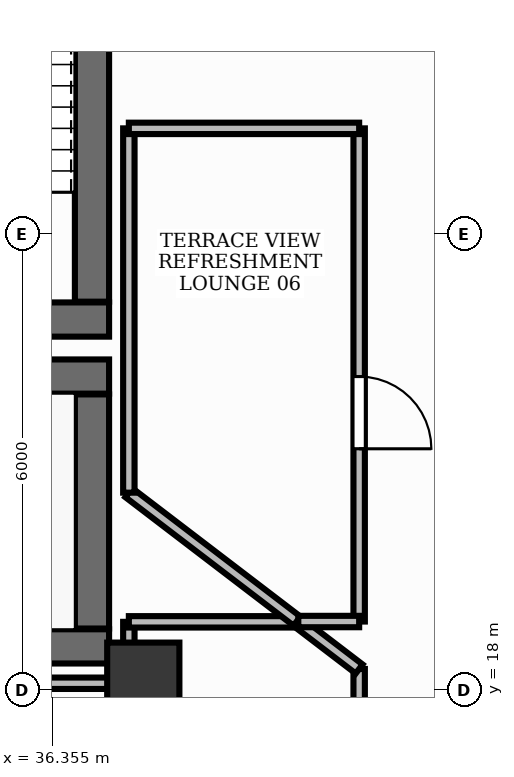
"""IFC4 building model, lengths in metres.
Left out: names, types, materials, properties, quantities, classifications, styles, units other than length and angle.
Written with IfcOpenShell. Run it as: python <this file> out.ifc"""

import sys

from ifc_helpers import new_model, si_unit, direction, frame, frame_2d, origin, origin_2d, place, context, subcontext, project, spatial, rectangle, extrude, element, fill, save


model = new_model("IFC4")
c1 = context("Model", 3, precision=1e-05, world=origin(), true_north=direction((0.0, 1.0)))
c2 = subcontext(c1, "Body", "Model", "MODEL_VIEW")
j1 = project(units=[si_unit("LENGTHUNIT", "METRE"), si_unit("PLANEANGLEUNIT", "RADIAN")], contexts=[c1])
p1 = place(None, origin())
s1 = spatial("IfcSite", under=j1, at=p1, CompositionType="ELEMENT")
p2 = place(p1, origin())
s2 = spatial("IfcBuilding", under=s1, at=p2, CompositionType="ELEMENT")
p3 = place(p2, frame((0.0, 0.0, 25.8)))
s3 = spatial("IfcBuildingStorey", under=s2, at=p3, CompositionType="ELEMENT", Elevation=25.8)
p4 = place(p3, frame((28.852, 18.575, 0.0), z_axis=(0.0, 0.0, 1.0), x_axis=(1.0, 0.0, 0.0)))
e1 = element("IfcWall", 1, at=p4, inside=s3, PredefinedType="SHEAR", context=c2, shape_type="SweptSolid", body=[
    extrude(rectangle(XDim=8.248, YDim=0.45, at=frame_2d((4.124, 0.0))), origin(), (0.0, 0.0, 1.0), 3.9),
])
p5 = place(p3, frame((28.35, 22.125, 0.0), z_axis=(0.0, 0.0, 1.0), x_axis=(1.0, 0.0, 0.0)))
e2 = element("IfcWall", 2, at=p5, inside=s3, PredefinedType="SHEAR", context=c2, shape_type="SweptSolid", body=[
    extrude(rectangle(XDim=8.75, YDim=0.45, at=frame_2d((4.375, 0.0))), origin(), (0.0, 0.0, 1.0), 3.9),
])
p6 = place(p3, frame((36.875, 18.81, 0.0), z_axis=(0.0, 0.0, 1.0), x_axis=(0.0, 1.0, 0.0)))
e3 = element("IfcWall", 3, at=p6, inside=s3, PredefinedType="SHEAR", context=c2, shape_type="SweptSolid", body=[
    extrude(rectangle(XDim=3.08, YDim=0.45, at=frame_2d((1.54, 0.0))), origin(), (0.0, 0.0, 1.0), 3.9),
])
p7 = place(p3, frame((33.1, 22.875, 0.0), z_axis=(0.0, 0.0, 1.0), x_axis=(1.0, 0.0, 0.0)))
e4 = element("IfcWall", 4, at=p7, inside=s3, PredefinedType="SHEAR", context=c2, shape_type="SweptSolid", body=[
    extrude(rectangle(XDim=4.0, YDim=0.45, at=frame_2d((2.0, 0.0))), origin(), (0.0, 0.0, 1.0), 3.9),
])
p8 = place(p3, frame((36.875, 23.11, 0.0), z_axis=(0.0, 0.0, 1.0), x_axis=(0.0, 1.0, 0.0)))
e5 = element("IfcWall", 5, at=p8, inside=s3, PredefinedType="SHEAR", context=c2, shape_type="SweptSolid", body=[
    extrude(rectangle(XDim=7.78, YDim=0.45, at=frame_2d((3.89, 0.0))), origin(), (0.0, 0.0, 1.0), 3.9),
])
p9 = place(p3, frame((37.55, 18.15, -0.0), z_axis=(0.0, 0.0, 1.0), x_axis=(1.0, 0.0, 0.0)))
e6 = element("IfcColumn", 6, at=p9, inside=s3, PredefinedType="PILASTER", context=c2, shape_type="SweptSolid", body=[
    extrude(rectangle(XDim=0.95, YDim=0.95, at=origin_2d()), origin(), (0.0, 0.0, 1.0), 3.901),
])
p10 = place(p3, frame((40.39, 18.278, 0.0), z_axis=(0.0, 0.0, 1.0), x_axis=(0.0, -1.0, 0.0)))
e7 = element("IfcWall", 7, at=p10, inside=s3, PredefinedType="PARTITIONING", context=c2, shape_type="SweptSolid", body=[
    extrude(rectangle(XDim=1.778, YDim=0.15, at=frame_2d((0.889, 0.0))), origin(), (0.0, 0.0, 1.0), 2.91),
])
p11 = place(p10, frame((0.588, 0.0, 0.0)))
e8 = element("IfcOpeningElement", 8, at=p11, cuts=e7, PredefinedType="OPENING", context=c2, shape_type="SweptSolid", body=[
    extrude(rectangle(XDim=0.95, YDim=2.15, at=frame_2d((0.475, 1.075))), frame((0.0, 0.09, 0.0), z_axis=(0.0, -1.0, 0.0), x_axis=(1.0, 0.0, 0.0)), (0.0, 0.0, 1.0), 0.18),
])
p12 = place(p3, frame((40.39, 25.39, 0.0), z_axis=(0.0, 0.0, 1.0), x_axis=(0.0, -1.0, 0.0)))
e9 = element("IfcWall", 9, at=p12, inside=s3, PredefinedType="PARTITIONING", context=c2, shape_type="SweptSolid", body=[
    extrude(rectangle(XDim=6.488, YDim=0.15, at=frame_2d((3.244, 0.0))), origin(), (0.0, 0.0, 1.0), 2.91),
])
p13 = place(p12, frame((3.265, 0.0, 0.0)))
e10 = element("IfcOpeningElement", 10, at=p13, cuts=e9, PredefinedType="OPENING", context=c2, shape_type="SweptSolid", body=[
    extrude(rectangle(XDim=0.95, YDim=2.15, at=frame_2d((0.475, 1.075))), frame((0.0, 0.09, 0.0), z_axis=(0.0, -1.0, 0.0), x_axis=(1.0, 0.0, 0.0)), (0.0, 0.0, 1.0), 0.18),
])
p14 = place(p3, frame((29.0, 18.09, 0.0), z_axis=(0.0, 0.0, 1.0), x_axis=(1.0, 0.0, 0.0)))
e11 = element("IfcWall", 11, at=p14, inside=s3, PredefinedType="PARTITIONING", context=c2, shape_type="SweptSolid", body=[
    extrude(rectangle(XDim=8.35, YDim=0.15, at=frame_2d((4.175, 0.0))), origin(), (0.0, 0.0, 1.0), 2.91),
])
p15 = place(p3, frame((37.36, 18.1, 0.0), z_axis=(0.0, 0.0, 1.0), x_axis=(0.0, 1.0, 0.0)))
e12 = element("IfcWall", 12, at=p15, inside=s3, PredefinedType="PARTITIONING", context=c2, shape_type="SweptSolid", body=[
    extrude(rectangle(XDim=0.798, YDim=0.15, at=frame_2d((0.399, 0.0))), origin(), (0.0, 0.0, 1.0), 2.91),
])
p16 = place(p3, frame((37.36, 18.898, 0.0), z_axis=(0.0, 0.0, 1.0), x_axis=(1.0, 0.0, 0.0)))
e13 = element("IfcWall", 13, at=p16, inside=s3, PredefinedType="PARTITIONING", context=c2, shape_type="SweptSolid", body=[
    extrude(rectangle(XDim=2.218, YDim=0.15, at=frame_2d((1.109, 0.0))), origin(), (0.0, 0.0, 1.0), 2.91),
])
p17 = place(p3, frame((39.578, 18.898, 0.0), z_axis=(0.0, 0.0, 1.0), x_axis=(0.794690228638, -0.607015189684, 0.0)))
e14 = element("IfcWall", 14, at=p17, inside=s3, PredefinedType="PARTITIONING", context=c2, shape_type="SweptSolid", body=[
    extrude(rectangle(XDim=1.021, YDim=0.15, at=frame_2d((0.511, 0.0))), origin(), (0.0, 0.0, 1.0), 2.91),
])
p18 = place(p3, frame((39.572, 18.908, 0.0), z_axis=(0.0, 0.0, 1.0), x_axis=(-0.794673946055, 0.607036505872, 0.0)))
e15 = element("IfcWall", 15, at=p18, inside=s3, PredefinedType="PARTITIONING", context=c2, shape_type="SweptSolid", body=[
    extrude(rectangle(XDim=2.783, YDim=0.15, at=frame_2d((1.392, 0.0))), origin(), (0.0, 0.0, 1.0), 2.91),
])
p19 = place(p3, frame((37.36, 20.597, 0.0), z_axis=(0.0, 0.0, 1.0), x_axis=(0.0, 1.0, 0.0)))
e16 = element("IfcWall", 16, at=p19, inside=s3, PredefinedType="PARTITIONING", context=c2, shape_type="SweptSolid", body=[
    extrude(rectangle(XDim=4.792, YDim=0.15, at=frame_2d((2.396, 0.0))), origin(), (0.0, 0.0, 1.0), 2.91),
])
p20 = place(p3, frame((37.36, 25.39, 0.0), z_axis=(0.0, 0.0, 1.0), x_axis=(1.0, 0.0, 0.0)))
e17 = element("IfcWall", 17, at=p20, inside=s3, PredefinedType="PARTITIONING", context=c2, shape_type="SweptSolid", body=[
    extrude(rectangle(XDim=3.03, YDim=0.15, at=frame_2d((1.515, 0.0))), origin(), (0.0, 0.0, 1.0), 2.91),
])
p21 = place(p3, frame((40.39, 18.902, 0.0), z_axis=(0.0, 0.0, 1.0), x_axis=(-1.0, 0.0, 0.0)))
e18 = element("IfcWall", 18, at=p21, inside=s3, PredefinedType="PARTITIONING", context=c2, shape_type="SweptSolid", body=[
    extrude(rectangle(XDim=0.8, YDim=0.15, at=frame_2d((0.4, 0.0))), origin(), (0.0, 0.0, 1.0), 2.91),
])
p22 = place(p13, origin())
e19 = element("IfcDoor", 19, at=p22, inside=s3, OperationType="SINGLE_SWING_RIGHT", PredefinedType="DOOR", context=c2, shape_type="SweptSolid", body=[
    extrude(rectangle(XDim=0.95, YDim=2.15, at=frame_2d((0.475, 1.075))), frame((0.0, 0.025, 0.0), z_axis=(0.0, -1.0, 0.0), x_axis=(1.0, 0.0, 0.0)), (0.0, 0.0, 1.0), 0.05),
])
fill(e10, e19)
save(model, sys.argv[1])
